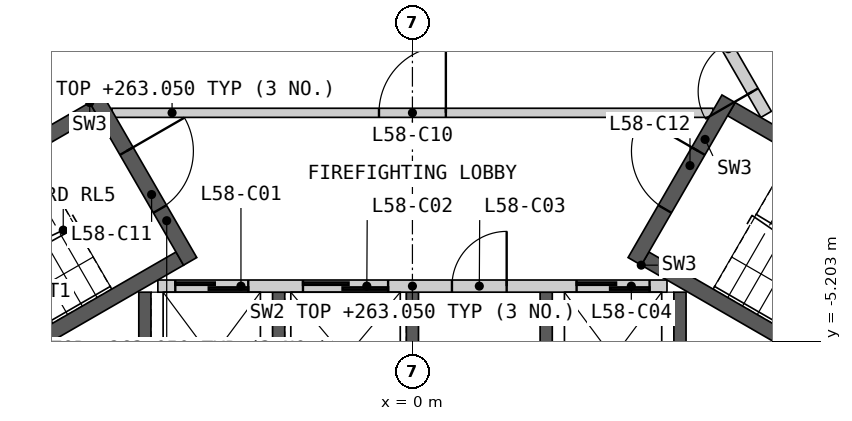
"""IFC4 building model, lengths in metres.
Left out: names, types, materials, properties, quantities, classifications, styles, units other than length and angle.
Written with IfcOpenShell. Run it as: python <this file> out.ifc"""

import sys

from ifc_helpers import new_model, si_unit, direction, frame, frame_2d, origin, place, context, subcontext, project, spatial, polyline, rectangle, outline, extrude, element, fill, save


model = new_model("IFC4")
c1 = context("Model", 3, precision=1e-05, world=origin(), true_north=direction((0.0, 1.0)))
c2 = subcontext(c1, "Body", "Model", "MODEL_VIEW")
j1 = project(units=[si_unit("LENGTHUNIT", "METRE"), si_unit("PLANEANGLEUNIT", "RADIAN")], contexts=[c1])
p1 = place(None, origin())
s1 = spatial("IfcSite", under=j1, at=p1, CompositionType="ELEMENT")
p2 = place(p1, origin())
s2 = spatial("IfcBuilding", under=s1, at=p2, CompositionType="ELEMENT")
p3 = place(p2, frame((0.0, 0.0, 259.8)))
s3 = spatial("IfcBuildingStorey", under=s2, at=p3, CompositionType="ELEMENT", Elevation=259.8)
p4 = place(p3, origin())
e1 = element("IfcWall", 1, at=p4, inside=s3, PredefinedType="SHEAR", context=c2, shape_type="SweptSolid", body=[
    extrude(outline(polyline([(0.1, -7.36), (-4.5, -7.36), (-4.5, -4.4), (-4.3, -4.4), (-4.3, -6.7), (-2.3, -6.7), (-2.3, -4.4), (-2.1, -4.4), (-2.1, -6.7), (-0.1, -6.7), (-0.1, -4.4), (0.1, -4.4), (0.1, -7.36)])), origin(), (0.0, 0.0, 1.0), 3.25),
])
p5 = place(p3, origin())
e2 = element("IfcWall", 2, at=p5, inside=s3, PredefinedType="SHEAR", context=c2, shape_type="SweptSolid", body=[
    extrude(outline(polyline([(2.1, -7.36), (2.1, -4.4), (2.3, -4.4), (2.3, -6.7), (4.3, -6.7), (4.3, -4.4), (4.5, -4.4), (4.5, -7.36), (2.1, -7.36)])), origin(), (0.0, 0.0, 1.0), 3.25),
])
p6 = place(p3, frame((-4.187, -4.3, 0.0), z_axis=(0.0, 0.0, 1.0), x_axis=(1.0, 0.0, 0.0)))
e3 = element("IfcWall", 3, at=p6, inside=s3, PredefinedType="SOLIDWALL", context=c2, shape_type="SweptSolid", body=[
    extrude(rectangle(XDim=8.373, YDim=0.2, at=frame_2d((4.187, 0.0))), origin(), (0.0, 0.0, 1.0), 3.25),
])
p7 = place(p6, frame((0.287, 0.0, 0.0)))
e4 = element("IfcOpeningElement", 4, at=p7, cuts=e3, PredefinedType="OPENING", context=c2, shape_type="SweptSolid", body=[
    extrude(rectangle(XDim=1.2, YDim=2.1, at=frame_2d((0.6, 1.05))), frame((0.0, 0.11, 0.0), z_axis=(0.0, -1.0, 0.0), x_axis=(1.0, 0.0, 0.0)), (0.0, 0.0, 1.0), 0.22),
])
p8 = place(p6, frame((2.387, 0.0, 0.0)))
e5 = element("IfcOpeningElement", 5, at=p8, cuts=e3, PredefinedType="OPENING", context=c2, shape_type="SweptSolid", body=[
    extrude(rectangle(XDim=1.4, YDim=2.1, at=frame_2d((0.7, 1.05))), frame((0.0, 0.11, 0.0), z_axis=(0.0, -1.0, 0.0), x_axis=(1.0, 0.0, 0.0)), (0.0, 0.0, 1.0), 0.22),
])
p9 = place(p6, frame((4.837, 0.0, 0.0)))
e6 = element("IfcOpeningElement", 6, at=p9, cuts=e3, PredefinedType="OPENING", context=c2, shape_type="SweptSolid", body=[
    extrude(rectangle(XDim=0.9, YDim=2.1, at=frame_2d((0.45, 1.05))), frame((0.0, 0.11, 0.0), z_axis=(0.0, -1.0, 0.0), x_axis=(1.0, 0.0, 0.0)), (0.0, 0.0, 1.0), 0.22),
])
p10 = place(p6, frame((6.887, 0.0, 0.0)))
e7 = element("IfcOpeningElement", 7, at=p10, cuts=e3, PredefinedType="OPENING", context=c2, shape_type="SweptSolid", body=[
    extrude(rectangle(XDim=1.2, YDim=2.1, at=frame_2d((0.6, 1.05))), frame((0.0, 0.11, 0.0), z_axis=(0.0, -1.0, 0.0), x_axis=(1.0, 0.0, 0.0)), (0.0, 0.0, 1.0), 0.22),
])
p11 = place(p3, frame((5.817, -1.476, 0.0), z_axis=(0.0, 0.0, 1.0), x_axis=(-0.500002616675, 0.866023893041, 0.0)))
e8 = element("IfcWall", 8, at=p11, inside=s3, PredefinedType="SOLIDWALL", context=c2, shape_type="SweptSolid", body=[
    extrude(rectangle(XDim=8.373, YDim=0.2, at=frame_2d((4.187, 0.0))), origin(), (0.0, 0.0, 1.0), 3.25),
])
p12 = place(p11, frame((0.437, 0.0, 0.0)))
e9 = element("IfcOpeningElement", 9, at=p12, cuts=e8, PredefinedType="OPENING", context=c2, shape_type="SweptSolid", body=[
    extrude(rectangle(XDim=0.9, YDim=2.1, at=frame_2d((0.45, 1.05))), frame((0.0, 0.11, 0.0), z_axis=(0.0, -1.0, 0.0), x_axis=(1.0, 0.0, 0.0)), (0.0, 0.0, 1.0), 0.22),
])
p13 = place(p11, frame((3.737, 0.0, 0.0)))
e10 = element("IfcOpeningElement", 10, at=p13, cuts=e8, PredefinedType="OPENING", context=c2, shape_type="SweptSolid", body=[
    extrude(rectangle(XDim=0.9, YDim=2.1, at=frame_2d((0.45, 1.05))), frame((0.0, 0.11, 0.0), z_axis=(0.0, -1.0, 0.0), x_axis=(1.0, 0.0, 0.0)), (0.0, 0.0, 1.0), 0.22),
])
p14 = place(p11, frame((6.937, 0.0, 0.0)))
e11 = element("IfcOpeningElement", 11, at=p14, cuts=e8, PredefinedType="OPENING", context=c2, shape_type="SweptSolid", body=[
    extrude(rectangle(XDim=1.1, YDim=2.1, at=frame_2d((0.55, 1.05))), frame((0.0, 0.11, 0.0), z_axis=(0.0, -1.0, 0.0), x_axis=(1.0, 0.0, 0.0)), (0.0, 0.0, 1.0), 0.22),
])
p15 = place(p3, frame((-4.941, -1.45, 0.0), z_axis=(0.0, 0.0, 1.0), x_axis=(1.0, 0.0, 0.0)))
e12 = element("IfcWall", 12, at=p15, inside=s3, PredefinedType="PARTITIONING", context=c2, shape_type="SweptSolid", body=[
    extrude(rectangle(XDim=9.882, YDim=0.15, at=frame_2d((4.941, 0.0))), origin(), (0.0, 0.0, 1.0), 3.25),
])
p16 = place(p15, frame((4.391, 0.0, 0.0)))
e13 = element("IfcOpeningElement", 13, at=p16, cuts=e12, PredefinedType="OPENING", context=c2, shape_type="SweptSolid", body=[
    extrude(rectangle(XDim=1.1, YDim=2.1, at=frame_2d((0.55, 1.05))), frame((0.0, 0.085, 0.0), z_axis=(0.0, -1.0, 0.0), x_axis=(1.0, 0.0, 0.0)), (0.0, 0.0, 1.0), 0.17),
])
p17 = place(p3, origin())
e14 = element("IfcWall", 14, at=p17, inside=s3, PredefinedType="SHEAR", context=c2, shape_type="SweptSolid", body=[
    extrude(outline(polyline([(-5.307, -1.281), (-10.374, -4.206), (-10.032, -4.298), (-5.182, -1.498), (-5.307, -1.281)])), origin(), (0.0, 0.0, 1.0), 3.25),
])
p18 = place(p3, origin())
e15 = element("IfcWall", 15, at=p18, inside=s3, PredefinedType="SHEAR", context=c2, shape_type="SweptSolid", body=[
    extrude(outline(polyline([(-8.738, -6.539), (-8.83, -6.881), (-3.763, -3.956), (-3.888, -3.739), (-8.738, -6.539)])), origin(), (0.0, 0.0, 1.0), 3.25),
])
p19 = place(p3, frame((-5.199, -1.219, 0.0), z_axis=(0.0, 0.0, 1.0), x_axis=(0.499982516597, -0.866035497597, 0.0)))
e16 = element("IfcWall", 16, at=p19, inside=s3, PredefinedType="SHEAR", context=c2, shape_type="SweptSolid", body=[
    extrude(rectangle(XDim=3.088, YDim=0.25, at=frame_2d((1.544, 0.0))), origin(), (0.0, 0.0, 1.0), 3.25),
])
p20 = place(p19, frame((0.994, 0.0, 0.0)))
e17 = element("IfcOpeningElement", 17, at=p20, cuts=e16, PredefinedType="OPENING", context=c2, shape_type="SweptSolid", body=[
    extrude(rectangle(XDim=1.1, YDim=2.1, at=frame_2d((0.55, 1.05))), frame((0.0, 0.135, 0.0), z_axis=(0.0, -1.0, 0.0), x_axis=(1.0, 0.0, 0.0)), (0.0, 0.0, 1.0), 0.27),
])
p21 = place(p3, origin())
e18 = element("IfcWall", 18, at=p21, inside=s3, PredefinedType="SHEAR", context=c2, shape_type="SweptSolid", body=[
    extrude(outline(polyline([(3.763, -3.956), (8.83, -6.881), (8.738, -6.539), (3.888, -3.739), (3.763, -3.956)])), origin(), (0.0, 0.0, 1.0), 3.25),
])
p22 = place(p3, origin())
e19 = element("IfcWall", 19, at=p22, inside=s3, PredefinedType="SHEAR", context=c2, shape_type="SweptSolid", body=[
    extrude(outline(polyline([(10.032, -4.298), (10.374, -4.206), (5.307, -1.281), (5.182, -1.498), (10.032, -4.298)])), origin(), (0.0, 0.0, 1.0), 3.25),
])
p23 = place(p3, frame((3.655, -3.893, 0.0), z_axis=(0.0, 0.0, 1.0), x_axis=(0.499982516597, 0.866035497597, 0.0)))
e20 = element("IfcWall", 20, at=p23, inside=s3, PredefinedType="SHEAR", context=c2, shape_type="SweptSolid", body=[
    extrude(rectangle(XDim=3.088, YDim=0.25, at=frame_2d((1.544, 0.0))), origin(), (0.0, 0.0, 1.0), 3.25),
])
p24 = place(p23, frame((0.994, 0.0, 0.0)))
e21 = element("IfcOpeningElement", 21, at=p24, cuts=e20, PredefinedType="OPENING", context=c2, shape_type="SweptSolid", body=[
    extrude(rectangle(XDim=1.1, YDim=2.1, at=frame_2d((0.55, 1.05))), frame((0.0, 0.135, 0.0), z_axis=(0.0, -1.0, 0.0), x_axis=(1.0, 0.0, 0.0)), (0.0, 0.0, 1.0), 0.27),
])
p25 = place(p3, frame((10.081, -1.441, 0.0), z_axis=(0.0, 0.0, 1.0), x_axis=(-0.500006109471, 0.866021876451, 0.0)))
e22 = element("IfcWall", 22, at=p25, inside=s3, PredefinedType="SHEAR", context=c2, shape_type="SweptSolid", body=[
    extrude(rectangle(XDim=11.672, YDim=1.3, at=frame_2d((5.836, 0.0))), origin(), (0.0, 0.0, 1.0), 3.25),
])
p26 = place(p3, frame((5.377, 18.807, 0.0), z_axis=(0.0, 0.0, 1.0), x_axis=(0.499999852422, -0.866025488988, 0.0)))
e23 = element("IfcWall", 23, at=p26, inside=s3, PredefinedType="PARTITIONING", context=c2, shape_type="SweptSolid", body=[
    extrude(rectangle(XDim=27.198, YDim=0.2, at=frame_2d((13.599, 0.0))), origin(), (0.0, 0.0, 1.0), 3.25),
])
p27 = place(p26, frame((25.096, 0.0, 0.0)))
e24 = element("IfcOpeningElement", 24, at=p27, cuts=e23, PredefinedType="OPENING", context=c2, shape_type="SweptSolid", body=[
    extrude(rectangle(XDim=0.95, YDim=2.1, at=frame_2d((0.475, 1.05))), frame((0.0, 0.11, 0.0), z_axis=(0.0, -1.0, 0.0), x_axis=(1.0, 0.0, 0.0)), (0.0, 0.0, 1.0), 0.22),
])
p28 = place(p26, frame((19.122, 0.0, 0.0)))
e25 = element("IfcOpeningElement", 25, at=p28, cuts=e23, PredefinedType="OPENING", context=c2, shape_type="SweptSolid", body=[
    extrude(rectangle(XDim=1.0, YDim=2.1, at=frame_2d((0.5, 1.05))), frame((0.0, 0.11, 0.0), z_axis=(0.0, -1.0, 0.0), x_axis=(1.0, 0.0, 0.0)), (0.0, 0.0, 1.0), 0.22),
])
p29 = place(p26, frame((17.115, 0.0, 0.0)))
e26 = element("IfcOpeningElement", 26, at=p29, cuts=e23, PredefinedType="OPENING", context=c2, shape_type="SweptSolid", body=[
    extrude(rectangle(XDim=1.1, YDim=2.1, at=frame_2d((0.55, 1.05))), frame((0.0, 0.11, 0.0), z_axis=(0.0, -1.0, 0.0), x_axis=(1.0, 0.0, 0.0)), (0.0, 0.0, 1.0), 0.22),
])
p30 = place(p26, frame((0.35, 0.0, 0.0)))
e27 = element("IfcOpeningElement", 27, at=p30, cuts=e23, PredefinedType="OPENING", context=c2, shape_type="SweptSolid", body=[
    extrude(rectangle(XDim=1.1, YDim=2.1, at=frame_2d((0.55, 1.05))), frame((0.0, 0.11, 0.0), z_axis=(0.0, -1.0, 0.0), x_axis=(1.0, 0.0, 0.0)), (0.0, 0.0, 1.0), 0.22),
])
p31 = place(p7, origin())
e28 = element("IfcDoor", 28, at=p31, inside=s3, OperationType="SLIDING_TO_LEFT", PredefinedType="DOOR", context=c2, shape_type="SweptSolid", body=[
    extrude(rectangle(XDim=1.2, YDim=2.1, at=frame_2d((0.6, 1.05))), frame((0.0, 0.025, 0.0), z_axis=(0.0, -1.0, 0.0), x_axis=(1.0, 0.0, 0.0)), (0.0, 0.0, 1.0), 0.05),
])
fill(e4, e28)
p32 = place(p8, origin())
e29 = element("IfcDoor", 29, at=p32, inside=s3, OperationType="SLIDING_TO_LEFT", PredefinedType="DOOR", context=c2, shape_type="SweptSolid", body=[
    extrude(rectangle(XDim=1.4, YDim=2.1, at=frame_2d((0.7, 1.05))), frame((0.0, 0.025, 0.0), z_axis=(0.0, -1.0, 0.0), x_axis=(1.0, 0.0, 0.0)), (0.0, 0.0, 1.0), 0.05),
])
fill(e5, e29)
p33 = place(p9, origin())
e30 = element("IfcDoor", 30, at=p33, inside=s3, OperationType="SINGLE_SWING_RIGHT", PredefinedType="DOOR", context=c2, shape_type="SweptSolid", body=[
    extrude(rectangle(XDim=0.9, YDim=2.1, at=frame_2d((0.45, 1.05))), frame((0.0, 0.025, 0.0), z_axis=(0.0, -1.0, 0.0), x_axis=(1.0, 0.0, 0.0)), (0.0, 0.0, 1.0), 0.05),
])
fill(e6, e30)
p34 = place(p10, origin())
e31 = element("IfcDoor", 31, at=p34, inside=s3, OperationType="SLIDING_TO_LEFT", PredefinedType="DOOR", context=c2, shape_type="SweptSolid", body=[
    extrude(rectangle(XDim=1.2, YDim=2.1, at=frame_2d((0.6, 1.05))), frame((0.0, 0.025, 0.0), z_axis=(0.0, -1.0, 0.0), x_axis=(1.0, 0.0, 0.0)), (0.0, 0.0, 1.0), 0.05),
])
fill(e7, e31)
p35 = place(p12, origin())
e32 = element("IfcDoor", 32, at=p35, inside=s3, OperationType="SINGLE_SWING_LEFT", PredefinedType="DOOR", context=c2, shape_type="SweptSolid", body=[
    extrude(rectangle(XDim=0.9, YDim=2.1, at=frame_2d((0.45, 1.05))), frame((0.0, 0.025, 0.0), z_axis=(0.0, -1.0, 0.0), x_axis=(1.0, 0.0, 0.0)), (0.0, 0.0, 1.0), 0.05),
])
fill(e9, e32)
p36 = place(p16, origin())
e33 = element("IfcDoor", 33, at=p36, inside=s3, OperationType="SINGLE_SWING_RIGHT", PredefinedType="DOOR", context=c2, shape_type="SweptSolid", body=[
    extrude(rectangle(XDim=1.1, YDim=2.1, at=frame_2d((0.55, 1.05))), frame((0.0, 0.025, 0.0), z_axis=(0.0, -1.0, 0.0), x_axis=(1.0, 0.0, 0.0)), (0.0, 0.0, 1.0), 0.05),
])
fill(e13, e33)
p37 = place(p20, origin())
e34 = element("IfcDoor", 34, at=p37, inside=s3, OperationType="SINGLE_SWING_LEFT", PredefinedType="DOOR", context=c2, shape_type="SweptSolid", body=[
    extrude(rectangle(XDim=1.1, YDim=2.1, at=frame_2d((0.55, 1.05))), frame((0.0, 0.025, 0.0), z_axis=(0.0, -1.0, 0.0), x_axis=(1.0, 0.0, 0.0)), (0.0, 0.0, 1.0), 0.05),
])
fill(e17, e34)
p38 = place(p24, origin())
e35 = element("IfcDoor", 35, at=p38, inside=s3, OperationType="SINGLE_SWING_RIGHT", PredefinedType="DOOR", context=c2, shape_type="SweptSolid", body=[
    extrude(rectangle(XDim=1.1, YDim=2.1, at=frame_2d((0.55, 1.05))), frame((0.0, 0.025, 0.0), z_axis=(0.0, -1.0, 0.0), x_axis=(1.0, 0.0, 0.0)), (0.0, 0.0, 1.0), 0.05),
])
fill(e21, e35)
save(model, sys.argv[1])
